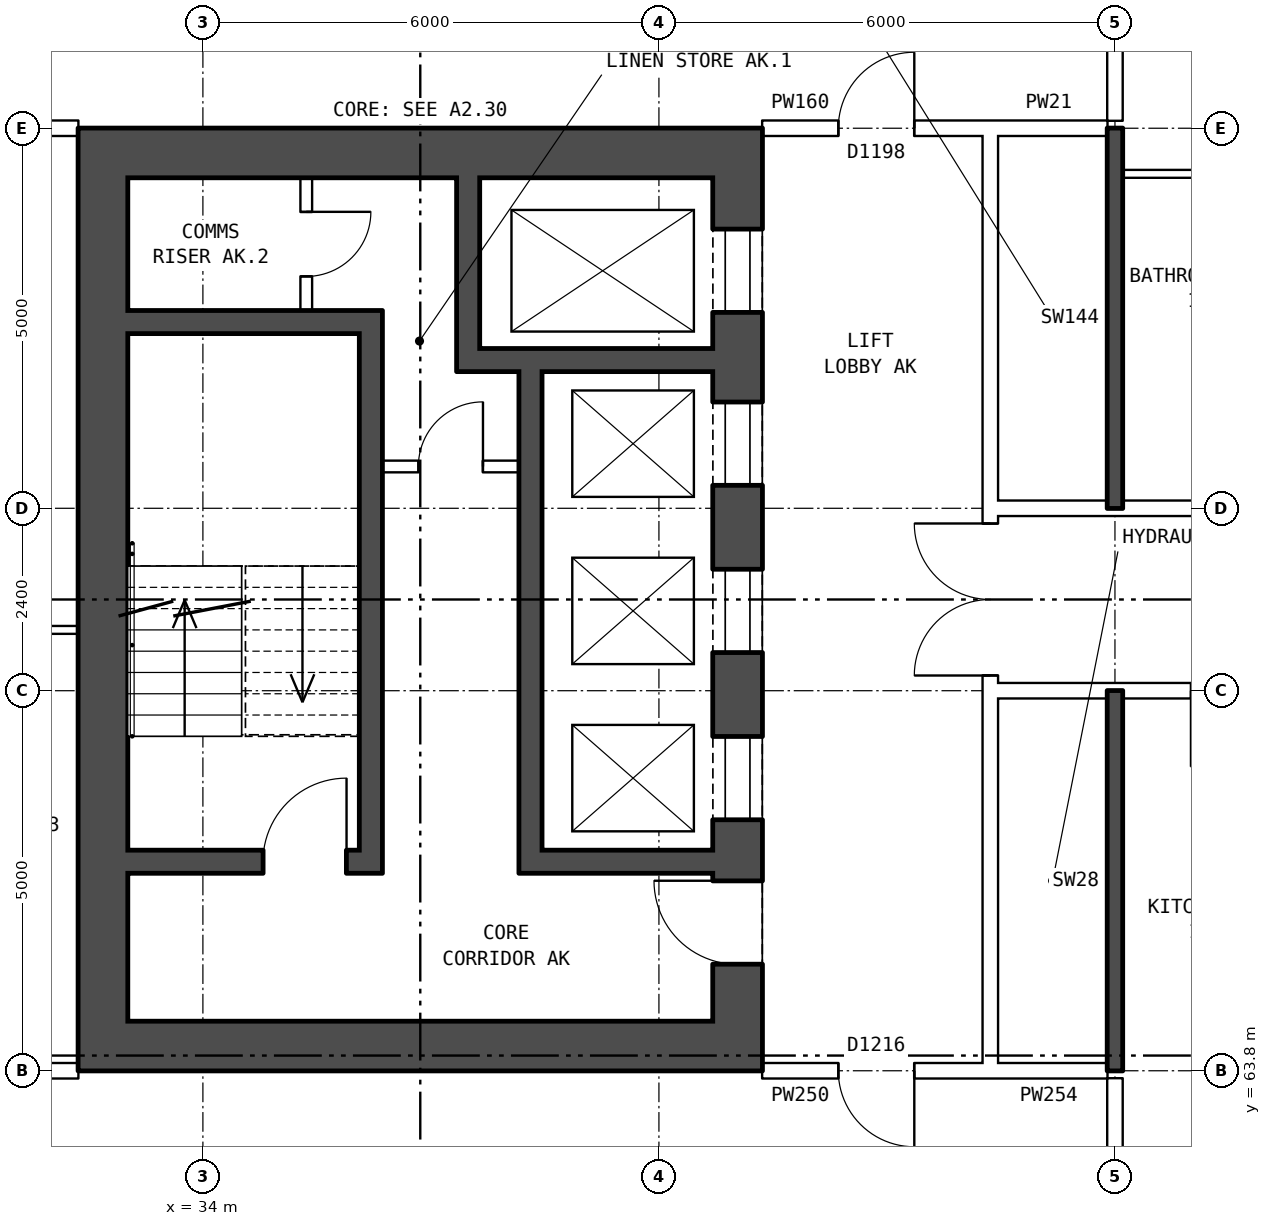
"""IFC4 building model, lengths in metres.
Left out: names, types, materials, properties, quantities, classifications, styles, units other than length and angle.
Written with IfcOpenShell. Run it as: python <this file> out.ifc"""

import sys

from ifc_helpers import new_model, si_unit, direction, frame, frame_2d, origin, place, context, subcontext, project, spatial, rectangle, extrude, element, fill, save


model = new_model("IFC4")
c1 = context("Model", 3, precision=1e-05, world=origin(), true_north=direction((0.0, 1.0)))
c2 = subcontext(c1, "Body", "Model", "MODEL_VIEW")
j1 = project(units=[si_unit("LENGTHUNIT", "METRE"), si_unit("PLANEANGLEUNIT", "RADIAN")], contexts=[c1])
p1 = place(None, origin())
s1 = spatial("IfcSite", under=j1, at=p1, CompositionType="ELEMENT")
p2 = place(p1, origin())
s2 = spatial("IfcBuilding", under=s1, at=p2, CompositionType="ELEMENT")
p3 = place(p2, frame((0.0, 0.0, 105.7)))
s3 = spatial("IfcBuildingStorey", under=s2, at=p3, CompositionType="ELEMENT", Elevation=105.7)
p4 = place(p3, frame((41.035, 75.55, 0.0), z_axis=(0.0, 0.0, 1.0), x_axis=(0.0, -1.0, 0.0)))
e1 = element("IfcWall", 1, at=p4, inside=s3, PredefinedType="SHEAR", context=c2, shape_type="SweptSolid", body=[
    extrude(rectangle(XDim=11.1, YDim=0.65, at=frame_2d((5.55, 0.0))), origin(), (0.0, 0.0, 1.0), 2.85),
])
p5 = place(p4, frame((0.675, 0.0, 0.0)))
e2 = element("IfcOpeningElement", 2, at=p5, cuts=e1, PredefinedType="OPENING", context=c2, shape_type="SweptSolid", body=[
    extrude(rectangle(XDim=1.1, YDim=2.1, at=frame_2d((0.55, 1.05))), frame((0.0, 0.335, 0.0), z_axis=(0.0, -1.0, 0.0), x_axis=(1.0, 0.0, 0.0)), (0.0, 0.0, 1.0), 0.67),
])
p6 = place(p4, frame((2.95, 0.0, 0.0)))
e3 = element("IfcOpeningElement", 3, at=p6, cuts=e1, PredefinedType="OPENING", context=c2, shape_type="SweptSolid", body=[
    extrude(rectangle(XDim=1.1, YDim=2.1, at=frame_2d((0.55, 1.05))), frame((0.0, 0.335, 0.0), z_axis=(0.0, -1.0, 0.0), x_axis=(1.0, 0.0, 0.0)), (0.0, 0.0, 1.0), 0.67),
])
p7 = place(p4, frame((5.15, 0.0, 0.0)))
e4 = element("IfcOpeningElement", 4, at=p7, cuts=e1, PredefinedType="OPENING", context=c2, shape_type="SweptSolid", body=[
    extrude(rectangle(XDim=1.1, YDim=2.1, at=frame_2d((0.55, 1.05))), frame((0.0, 0.335, 0.0), z_axis=(0.0, -1.0, 0.0), x_axis=(1.0, 0.0, 0.0)), (0.0, 0.0, 1.0), 0.67),
])
p8 = place(p4, frame((7.35, 0.0, 0.0)))
e5 = element("IfcOpeningElement", 5, at=p8, cuts=e1, PredefinedType="OPENING", context=c2, shape_type="SweptSolid", body=[
    extrude(rectangle(XDim=1.1, YDim=2.1, at=frame_2d((0.55, 1.05))), frame((0.0, 0.335, 0.0), z_axis=(0.0, -1.0, 0.0), x_axis=(1.0, 0.0, 0.0)), (0.0, 0.0, 1.0), 0.67),
])
p9 = place(p4, frame((9.25, 0.0, 0.0)))
e6 = element("IfcOpeningElement", 6, at=p9, cuts=e1, PredefinedType="OPENING", context=c2, shape_type="SweptSolid", body=[
    extrude(rectangle(XDim=1.1, YDim=2.1, at=frame_2d((0.55, 1.05))), frame((0.0, 0.335, 0.0), z_axis=(0.0, -1.0, 0.0), x_axis=(1.0, 0.0, 0.0)), (0.0, 0.0, 1.0), 0.67),
])
p10 = place(p3, frame((32.685, 75.55, 0.0), z_axis=(0.0, 0.0, 1.0), x_axis=(0.0, -1.0, 0.0)))
e7 = element("IfcWall", 7, at=p10, inside=s3, PredefinedType="SHEAR", context=c2, shape_type="SweptSolid", body=[
    extrude(rectangle(XDim=11.1, YDim=0.65, at=frame_2d((5.55, 0.0))), origin(), (0.0, 0.0, 1.0), 2.85),
])
for number, where, z_axis, x_axis in (
    (8, (41.36, 75.875, 0.0), (0.0, 0.0, 1.0), (-1.0, 0.0, 0.0)),
    (9, (41.36, 64.125, 0.0), (0.0, 0.0, 1.0), (-1.0, 0.0, 0.0)),
):
    element("IfcWall", number, at=place(p3, frame(where, z_axis=z_axis, x_axis=x_axis)), inside=s3, PredefinedType="SHEAR", context=c2, shape_type="SweptSolid", body=[
        extrude(rectangle(XDim=9.0, YDim=0.65, at=frame_2d((4.5, 0.0))), origin(), (0.0, 0.0, 1.0), 2.85),
    ])
p11 = place(p3, frame((36.06, 73.65, 0.0), z_axis=(0.0, 0.0, 1.0), x_axis=(-1.0, 0.0, 0.0)))
e10 = element("IfcWall", 10, at=p11, inside=s3, PredefinedType="SHEAR", context=c2, shape_type="SweptSolid", body=[
    extrude(rectangle(XDim=3.05, YDim=0.3, at=frame_2d((1.525, 0.0))), origin(), (0.0, 0.0, 1.0), 2.85),
])
p12 = place(p3, frame((40.71, 73.15, 0.0), z_axis=(0.0, 0.0, 1.0), x_axis=(-1.0, 0.0, 0.0)))
e11 = element("IfcWall", 11, at=p12, inside=s3, PredefinedType="SHEAR", context=c2, shape_type="SweptSolid", body=[
    extrude(rectangle(XDim=3.37, YDim=0.3, at=frame_2d((1.685, 0.0))), origin(), (0.0, 0.0, 1.0), 2.85),
])
p13 = place(p3, frame((38.16, 71.75, 0.0), z_axis=(0.0, 0.0, 1.0), x_axis=(-1.0, 0.0, 0.0)))
e12 = element("IfcWall", 12, at=p13, inside=s3, PredefinedType="PARTITIONING", context=c2, shape_type="SweptSolid", body=[
    extrude(rectangle(XDim=1.8, YDim=0.15, at=frame_2d((0.9, 0.0))), origin(), (0.0, 0.0, 1.0), 2.85),
])
p14 = place(p13, frame((0.475, 0.0, 0.0)))
e13 = element("IfcOpeningElement", 13, at=p14, cuts=e12, PredefinedType="OPENING", context=c2, shape_type="SweptSolid", body=[
    extrude(rectangle(XDim=0.85, YDim=2.1, at=frame_2d((0.425, 1.05))), frame((0.0, 0.085, 0.0), z_axis=(0.0, -1.0, 0.0), x_axis=(1.0, 0.0, 0.0)), (0.0, 0.0, 1.0), 0.17),
])
p15 = place(p3, frame((40.71, 66.55, 0.0), z_axis=(0.0, 0.0, 1.0), x_axis=(-1.0, 0.0, 0.0)))
e14 = element("IfcWall", 14, at=p15, inside=s3, PredefinedType="SHEAR", context=c2, shape_type="SweptSolid", body=[
    extrude(rectangle(XDim=2.25, YDim=0.3, at=frame_2d((1.125, 0.0))), origin(), (0.0, 0.0, 1.0), 2.85),
])
p16 = place(p3, frame((36.06, 66.55, 0.0), z_axis=(0.0, 0.0, 1.0), x_axis=(-1.0, 0.0, 0.0)))
e15 = element("IfcWall", 15, at=p16, inside=s3, PredefinedType="SHEAR", context=c2, shape_type="SweptSolid", body=[
    extrude(rectangle(XDim=3.05, YDim=0.3, at=frame_2d((1.525, 0.0))), origin(), (0.0, 0.0, 1.0), 2.85),
])
p17 = place(p16, frame((0.17, 0.0, 0.0)))
e16 = element("IfcOpeningElement", 16, at=p17, cuts=e15, PredefinedType="OPENING", context=c2, shape_type="SweptSolid", body=[
    extrude(rectangle(XDim=1.1, YDim=2.1, at=frame_2d((0.55, 1.05))), frame((0.0, 0.16, 0.0), z_axis=(0.0, -1.0, 0.0), x_axis=(1.0, 0.0, 0.0)), (0.0, 0.0, 1.0), 0.32),
])
p18 = place(p3, frame((38.31, 73.0, 0.0), z_axis=(0.0, 0.0, 1.0), x_axis=(0.0, -1.0, 0.0)))
e17 = element("IfcWall", 17, at=p18, inside=s3, PredefinedType="SHEAR", context=c2, shape_type="SweptSolid", body=[
    extrude(rectangle(XDim=6.6, YDim=0.3, at=frame_2d((3.3, 0.0))), origin(), (0.0, 0.0, 1.0), 2.85),
])
p19 = place(p3, frame((37.49, 75.55, 0.0), z_axis=(0.0, 0.0, 1.0), x_axis=(0.0, -1.0, 0.0)))
e18 = element("IfcWall", 18, at=p19, inside=s3, PredefinedType="SHEAR", context=c2, shape_type="SweptSolid", body=[
    extrude(rectangle(XDim=2.25, YDim=0.3, at=frame_2d((1.125, 0.0))), origin(), (0.0, 0.0, 1.0), 2.85),
])
p20 = place(p3, frame((36.21, 73.8, 0.0), z_axis=(0.0, 0.0, 1.0), x_axis=(0.0, -1.0, 0.0)))
e19 = element("IfcWall", 19, at=p20, inside=s3, PredefinedType="SHEAR", context=c2, shape_type="SweptSolid", body=[
    extrude(rectangle(XDim=7.4, YDim=0.3, at=frame_2d((3.7, 0.0))), origin(), (0.0, 0.0, 1.0), 2.85),
])
p21 = place(p3, frame((35.36, 75.55, 0.0), z_axis=(0.0, 0.0, 1.0), x_axis=(0.0, -1.0, 0.0)))
e20 = element("IfcWall", 20, at=p21, inside=s3, PredefinedType="PARTITIONING", context=c2, shape_type="SweptSolid", body=[
    extrude(rectangle(XDim=1.75, YDim=0.15, at=frame_2d((0.875, 0.0))), origin(), (0.0, 0.0, 1.0), 2.85),
])
p22 = place(p21, frame((0.45, 0.0, 0.0)))
e21 = element("IfcOpeningElement", 21, at=p22, cuts=e20, PredefinedType="OPENING", context=c2, shape_type="SweptSolid", body=[
    extrude(rectangle(XDim=0.85, YDim=2.1, at=frame_2d((0.425, 1.05))), frame((0.0, 0.085, 0.0), z_axis=(0.0, -1.0, 0.0), x_axis=(1.0, 0.0, 0.0)), (0.0, 0.0, 1.0), 0.17),
])
p23 = place(p3, frame((44.36, 63.9, 0.0), z_axis=(0.0, 0.0, 1.0), x_axis=(0.0, 1.0, 0.0)))
e22 = element("IfcWall", 22, at=p23, inside=s3, PredefinedType="PARTITIONING", context=c2, shape_type="SweptSolid", body=[
    extrude(rectangle(XDim=12.2, YDim=0.2, at=frame_2d((6.1, 0.0))), origin(), (0.0, 0.0, 1.0), 2.85),
])
p24 = place(p23, frame((5.1, 0.0, 0.0)))
e23 = element("IfcOpeningElement", 23, at=p24, cuts=e22, PredefinedType="OPENING", context=c2, shape_type="SweptSolid", body=[
    extrude(rectangle(XDim=2.0, YDim=2.1, at=frame_2d((1.0, 1.05))), frame((0.0, 0.11, 0.0), z_axis=(0.0, -1.0, 0.0), x_axis=(1.0, 0.0, 0.0)), (0.0, 0.0, 1.0), 0.22),
])
p25 = place(p3, frame((28.0, 63.8, 0.0), z_axis=(0.0, 0.0, 1.0), x_axis=(1.0, 0.0, 0.0)))
e24 = element("IfcWall", 24, at=p25, inside=s3, PredefinedType="PARTITIONING", context=c2, shape_type="SweptSolid", body=[
    extrude(rectangle(XDim=4.36, YDim=0.2, at=frame_2d((2.18, 0.0))), origin(), (0.0, 0.0, 1.0), 2.85),
])
p26 = place(p3, frame((41.36, 63.8, 0.0), z_axis=(0.0, 0.0, 1.0), x_axis=(1.0, 0.0, 0.0)))
e25 = element("IfcWall", 25, at=p26, inside=s3, PredefinedType="PARTITIONING", context=c2, shape_type="SweptSolid", body=[
    extrude(rectangle(XDim=3.0, YDim=0.2, at=frame_2d((1.5, 0.0))), origin(), (0.0, 0.0, 1.0), 2.85),
])
p27 = place(p26, frame((1.0, 0.0, 0.0)))
e26 = element("IfcOpeningElement", 26, at=p27, cuts=e25, PredefinedType="OPENING", context=c2, shape_type="SweptSolid", body=[
    extrude(rectangle(XDim=1.0, YDim=2.1, at=frame_2d((0.5, 1.05))), frame((0.0, 0.11, 0.0), z_axis=(0.0, -1.0, 0.0), x_axis=(1.0, 0.0, 0.0)), (0.0, 0.0, 1.0), 0.22),
])
p28 = place(p3, frame((44.36, 63.8, 0.0), z_axis=(0.0, 0.0, 1.0), x_axis=(1.0, 0.0, 0.0)))
e27 = element("IfcWall", 27, at=p28, inside=s3, PredefinedType="PARTITIONING", context=c2, shape_type="SweptSolid", body=[
    extrude(rectangle(XDim=1.54, YDim=0.2, at=frame_2d((0.77, 0.0))), origin(), (0.0, 0.0, 1.0), 2.85),
])
p29 = place(p3, frame((44.36, 68.8, 0.0), z_axis=(0.0, 0.0, 1.0), x_axis=(1.0, 0.0, 0.0)))
e28 = element("IfcWall", 28, at=p29, inside=s3, PredefinedType="PARTITIONING", context=c2, shape_type="SweptSolid", body=[
    extrude(rectangle(XDim=19.28, YDim=0.2, at=frame_2d((9.64, 0.0))), origin(), (0.0, 0.0, 1.0), 2.85),
])
p30 = place(p29, frame((17.46, 0.0, 0.0)))
e29 = element("IfcOpeningElement", 29, at=p30, cuts=e28, PredefinedType="OPENING", context=c2, shape_type="SweptSolid", body=[
    extrude(rectangle(XDim=1.0, YDim=2.1, at=frame_2d((0.5, 1.05))), frame((0.0, 0.11, 0.0), z_axis=(0.0, -1.0, 0.0), x_axis=(1.0, 0.0, 0.0)), (0.0, 0.0, 1.0), 0.22),
])
p31 = place(p29, frame((11.64, 0.0, 0.0)))
e30 = element("IfcOpeningElement", 30, at=p31, cuts=e28, PredefinedType="OPENING", context=c2, shape_type="SweptSolid", body=[
    extrude(rectangle(XDim=1.0, YDim=2.1, at=frame_2d((0.5, 1.05))), frame((0.0, 0.11, 0.0), z_axis=(0.0, -1.0, 0.0), x_axis=(1.0, 0.0, 0.0)), (0.0, 0.0, 1.0), 0.22),
])
p32 = place(p29, frame((2.64, 0.0, 0.0)))
e31 = element("IfcOpeningElement", 31, at=p32, cuts=e28, PredefinedType="OPENING", context=c2, shape_type="SweptSolid", body=[
    extrude(rectangle(XDim=1.0, YDim=2.1, at=frame_2d((0.5, 1.05))), frame((0.0, 0.11, 0.0), z_axis=(0.0, -1.0, 0.0), x_axis=(1.0, 0.0, 0.0)), (0.0, 0.0, 1.0), 0.22),
])
p33 = place(p3, frame((28.1, 69.6, 0.0), z_axis=(0.0, 0.0, 1.0), x_axis=(1.0, 0.0, 0.0)))
e32 = element("IfcWall", 32, at=p33, inside=s3, PredefinedType="PARTITIONING", context=c2, shape_type="SweptSolid", body=[
    extrude(rectangle(XDim=4.26, YDim=0.1, at=frame_2d((2.13, 0.0))), origin(), (0.0, 0.0, 1.0), 2.85),
])
p34 = place(p3, frame((44.36, 71.2, 0.0), z_axis=(0.0, 0.0, 1.0), x_axis=(1.0, 0.0, 0.0)))
e33 = element("IfcWall", 33, at=p34, inside=s3, PredefinedType="PARTITIONING", context=c2, shape_type="SweptSolid", body=[
    extrude(rectangle(XDim=19.28, YDim=0.2, at=frame_2d((9.64, 0.0))), origin(), (0.0, 0.0, 1.0), 2.85),
])
p35 = place(p34, frame((14.64, 0.0, 0.0)))
e34 = element("IfcOpeningElement", 34, at=p35, cuts=e33, PredefinedType="OPENING", context=c2, shape_type="SweptSolid", body=[
    extrude(rectangle(XDim=1.0, YDim=2.1, at=frame_2d((0.5, 1.05))), frame((0.0, 0.11, 0.0), z_axis=(0.0, -1.0, 0.0), x_axis=(1.0, 0.0, 0.0)), (0.0, 0.0, 1.0), 0.22),
])
p36 = place(p34, frame((5.64, 0.0, 0.0)))
e35 = element("IfcOpeningElement", 35, at=p36, cuts=e33, PredefinedType="OPENING", context=c2, shape_type="SweptSolid", body=[
    extrude(rectangle(XDim=1.0, YDim=2.1, at=frame_2d((0.5, 1.05))), frame((0.0, 0.11, 0.0), z_axis=(0.0, -1.0, 0.0), x_axis=(1.0, 0.0, 0.0)), (0.0, 0.0, 1.0), 0.22),
])
p37 = place(p3, frame((46.1, 75.6, 0.0), z_axis=(0.0, 0.0, 1.0), x_axis=(1.0, 0.0, 0.0)))
e36 = element("IfcWall", 36, at=p37, inside=s3, PredefinedType="PARTITIONING", context=c2, shape_type="SweptSolid", body=[
    extrude(rectangle(XDim=2.9, YDim=0.1, at=frame_2d((1.45, 0.0))), origin(), (0.0, 0.0, 1.0), 2.85),
])
p38 = place(p3, frame((28.0, 76.2, 0.0), z_axis=(0.0, 0.0, 1.0), x_axis=(1.0, 0.0, 0.0)))
e37 = element("IfcWall", 37, at=p38, inside=s3, PredefinedType="PARTITIONING", context=c2, shape_type="SweptSolid", body=[
    extrude(rectangle(XDim=4.36, YDim=0.2, at=frame_2d((2.18, 0.0))), origin(), (0.0, 0.0, 1.0), 2.85),
])
p39 = place(p3, frame((41.36, 76.2, 0.0), z_axis=(0.0, 0.0, 1.0), x_axis=(1.0, 0.0, 0.0)))
e38 = element("IfcWall", 38, at=p39, inside=s3, PredefinedType="PARTITIONING", context=c2, shape_type="SweptSolid", body=[
    extrude(rectangle(XDim=3.0, YDim=0.2, at=frame_2d((1.5, 0.0))), origin(), (0.0, 0.0, 1.0), 2.85),
])
p40 = place(p39, frame((1.0, 0.0, 0.0)))
e39 = element("IfcOpeningElement", 39, at=p40, cuts=e38, PredefinedType="OPENING", context=c2, shape_type="SweptSolid", body=[
    extrude(rectangle(XDim=1.0, YDim=2.1, at=frame_2d((0.5, 1.05))), frame((0.0, 0.11, 0.0), z_axis=(0.0, -1.0, 0.0), x_axis=(1.0, 0.0, 0.0)), (0.0, 0.0, 1.0), 0.22),
])
p41 = place(p3, frame((44.36, 76.2, 0.0), z_axis=(0.0, 0.0, 1.0), x_axis=(1.0, 0.0, 0.0)))
e40 = element("IfcWall", 40, at=p41, inside=s3, PredefinedType="PARTITIONING", context=c2, shape_type="SweptSolid", body=[
    extrude(rectangle(XDim=1.54, YDim=0.2, at=frame_2d((0.77, 0.0))), origin(), (0.0, 0.0, 1.0), 2.85),
])
p42 = place(p3, frame((46.0, 61.5, 0.0), z_axis=(0.0, 0.0, 1.0), x_axis=(0.0, 1.0, 0.0)))
e41 = element("IfcWall", 41, at=p42, inside=s3, PredefinedType="PARTITIONING", context=c2, shape_type="SweptSolid", body=[
    extrude(rectangle(XDim=2.2, YDim=0.2, at=frame_2d((1.1, 0.0))), origin(), (0.0, 0.0, 1.0), 2.85),
])
for number, where, z_axis, x_axis in (
    (42, (46.0, 63.8, 0.0), (0.0, 0.0, 1.0), (0.0, 1.0, 0.0)),
    (43, (46.0, 71.2, 0.0), (0.0, 0.0, 1.0), (0.0, 1.0, 0.0)),
):
    element("IfcWall", number, at=place(p3, frame(where, z_axis=z_axis, x_axis=x_axis)), inside=s3, PredefinedType="SOLIDWALL", context=c2, shape_type="SweptSolid", body=[
        extrude(rectangle(XDim=5.0, YDim=0.2, at=frame_2d((2.5, 0.0))), origin(), (0.0, 0.0, 1.0), 2.85),
    ])
p43 = place(p3, frame((46.0, 76.3, 0.0), z_axis=(0.0, 0.0, 1.0), x_axis=(0.0, 1.0, 0.0)))
e44 = element("IfcWall", 44, at=p43, inside=s3, PredefinedType="PARTITIONING", context=c2, shape_type="SweptSolid", body=[
    extrude(rectangle(XDim=2.2, YDim=0.2, at=frame_2d((1.1, 0.0))), origin(), (0.0, 0.0, 1.0), 2.85),
])
p44 = place(p5, origin())
e45 = element("IfcDoor", 45, at=p44, inside=s3, OperationType="DOUBLE_DOOR_SLIDING", PredefinedType="DOOR", context=c2, shape_type="SweptSolid", body=[
    extrude(rectangle(XDim=1.1, YDim=2.1, at=frame_2d((0.55, 1.05))), frame((0.0, -0.26, 0.0), z_axis=(0.0, -1.0, 0.0), x_axis=(1.0, 0.0, 0.0)), (0.0, 0.0, 1.0), 0.05),
])
fill(e2, e45)
p45 = place(p6, origin())
e46 = element("IfcDoor", 46, at=p45, inside=s3, OperationType="DOUBLE_DOOR_SLIDING", PredefinedType="DOOR", context=c2, shape_type="SweptSolid", body=[
    extrude(rectangle(XDim=1.1, YDim=2.1, at=frame_2d((0.55, 1.05))), frame((0.0, -0.26, 0.0), z_axis=(0.0, -1.0, 0.0), x_axis=(1.0, 0.0, 0.0)), (0.0, 0.0, 1.0), 0.05),
])
fill(e3, e46)
p46 = place(p7, origin())
e47 = element("IfcDoor", 47, at=p46, inside=s3, OperationType="DOUBLE_DOOR_SLIDING", PredefinedType="DOOR", context=c2, shape_type="SweptSolid", body=[
    extrude(rectangle(XDim=1.1, YDim=2.1, at=frame_2d((0.55, 1.05))), frame((0.0, -0.26, 0.0), z_axis=(0.0, -1.0, 0.0), x_axis=(1.0, 0.0, 0.0)), (0.0, 0.0, 1.0), 0.05),
])
fill(e4, e47)
p47 = place(p8, origin())
e48 = element("IfcDoor", 48, at=p47, inside=s3, OperationType="DOUBLE_DOOR_SLIDING", PredefinedType="DOOR", context=c2, shape_type="SweptSolid", body=[
    extrude(rectangle(XDim=1.1, YDim=2.1, at=frame_2d((0.55, 1.05))), frame((0.0, -0.26, 0.0), z_axis=(0.0, -1.0, 0.0), x_axis=(1.0, 0.0, 0.0)), (0.0, 0.0, 1.0), 0.05),
])
fill(e5, e48)
p48 = place(p9, frame((1.1, 0.0, 0.0), z_axis=(0.0, 0.0, 1.0), x_axis=(-1.0, 0.0, 0.0)))
e49 = element("IfcDoor", 49, at=p48, inside=s3, OperationType="SINGLE_SWING_RIGHT", PredefinedType="DOOR", context=c2, shape_type="SweptSolid", body=[
    extrude(rectangle(XDim=1.1, YDim=2.1, at=frame_2d((0.55, 1.05))), frame((0.0, 0.31, 0.0), z_axis=(0.0, -1.0, 0.0), x_axis=(1.0, 0.0, 0.0)), (0.0, 0.0, 1.0), 0.05),
])
fill(e6, e49)
p49 = place(p17, frame((1.1, 0.0, 0.0), z_axis=(0.0, 0.0, 1.0), x_axis=(-1.0, 0.0, 0.0)))
e50 = element("IfcDoor", 50, at=p49, inside=s3, OperationType="SINGLE_SWING_RIGHT", PredefinedType="DOOR", context=c2, shape_type="SweptSolid", body=[
    extrude(rectangle(XDim=1.1, YDim=2.1, at=frame_2d((0.55, 1.05))), frame((0.0, 0.025, 0.0), z_axis=(0.0, -1.0, 0.0), x_axis=(1.0, 0.0, 0.0)), (0.0, 0.0, 1.0), 0.05),
])
fill(e16, e50)
p50 = place(p14, frame((0.85, 0.0, 0.0), z_axis=(0.0, 0.0, 1.0), x_axis=(-1.0, 0.0, 0.0)))
e51 = element("IfcDoor", 51, at=p50, inside=s3, OperationType="SINGLE_SWING_RIGHT", PredefinedType="DOOR", context=c2, shape_type="SweptSolid", body=[
    extrude(rectangle(XDim=0.85, YDim=2.1, at=frame_2d((0.425, 1.05))), frame((0.0, 0.025, 0.0), z_axis=(0.0, -1.0, 0.0), x_axis=(1.0, 0.0, 0.0)), (0.0, 0.0, 1.0), 0.05),
])
fill(e13, e51)
p51 = place(p22, origin())
e52 = element("IfcDoor", 52, at=p51, inside=s3, OperationType="SINGLE_SWING_LEFT", PredefinedType="DOOR", context=c2, shape_type="SweptSolid", body=[
    extrude(rectangle(XDim=0.85, YDim=2.1, at=frame_2d((0.425, 1.05))), frame((0.0, 0.025, 0.0), z_axis=(0.0, -1.0, 0.0), x_axis=(1.0, 0.0, 0.0)), (0.0, 0.0, 1.0), 0.05),
])
fill(e21, e52)
p52 = place(p24, origin())
e53 = element("IfcDoor", 53, at=p52, inside=s3, OperationType="DOUBLE_DOOR_SINGLE_SWING", PredefinedType="DOOR", context=c2, shape_type="SweptSolid", body=[
    extrude(rectangle(XDim=2.0, YDim=2.1, at=frame_2d((1.0, 1.05))), frame((0.0, 0.025, 0.0), z_axis=(0.0, -1.0, 0.0), x_axis=(1.0, 0.0, 0.0)), (0.0, 0.0, 1.0), 0.05),
])
fill(e23, e53)
p53 = place(p27, frame((1.0, 0.0, 0.0), z_axis=(0.0, 0.0, 1.0), x_axis=(-1.0, 0.0, 0.0)))
e54 = element("IfcDoor", 54, at=p53, inside=s3, OperationType="SINGLE_SWING_LEFT", PredefinedType="DOOR", context=c2, shape_type="SweptSolid", body=[
    extrude(rectangle(XDim=1.0, YDim=2.1, at=frame_2d((0.5, 1.05))), frame((0.0, 0.025, 0.0), z_axis=(0.0, -1.0, 0.0), x_axis=(1.0, 0.0, 0.0)), (0.0, 0.0, 1.0), 0.05),
])
fill(e26, e54)
p54 = place(p40, origin())
e55 = element("IfcDoor", 55, at=p54, inside=s3, OperationType="SINGLE_SWING_RIGHT", PredefinedType="DOOR", context=c2, shape_type="SweptSolid", body=[
    extrude(rectangle(XDim=1.0, YDim=2.1, at=frame_2d((0.5, 1.05))), frame((0.0, 0.025, 0.0), z_axis=(0.0, -1.0, 0.0), x_axis=(1.0, 0.0, 0.0)), (0.0, 0.0, 1.0), 0.05),
])
fill(e39, e55)
save(model, sys.argv[1])
